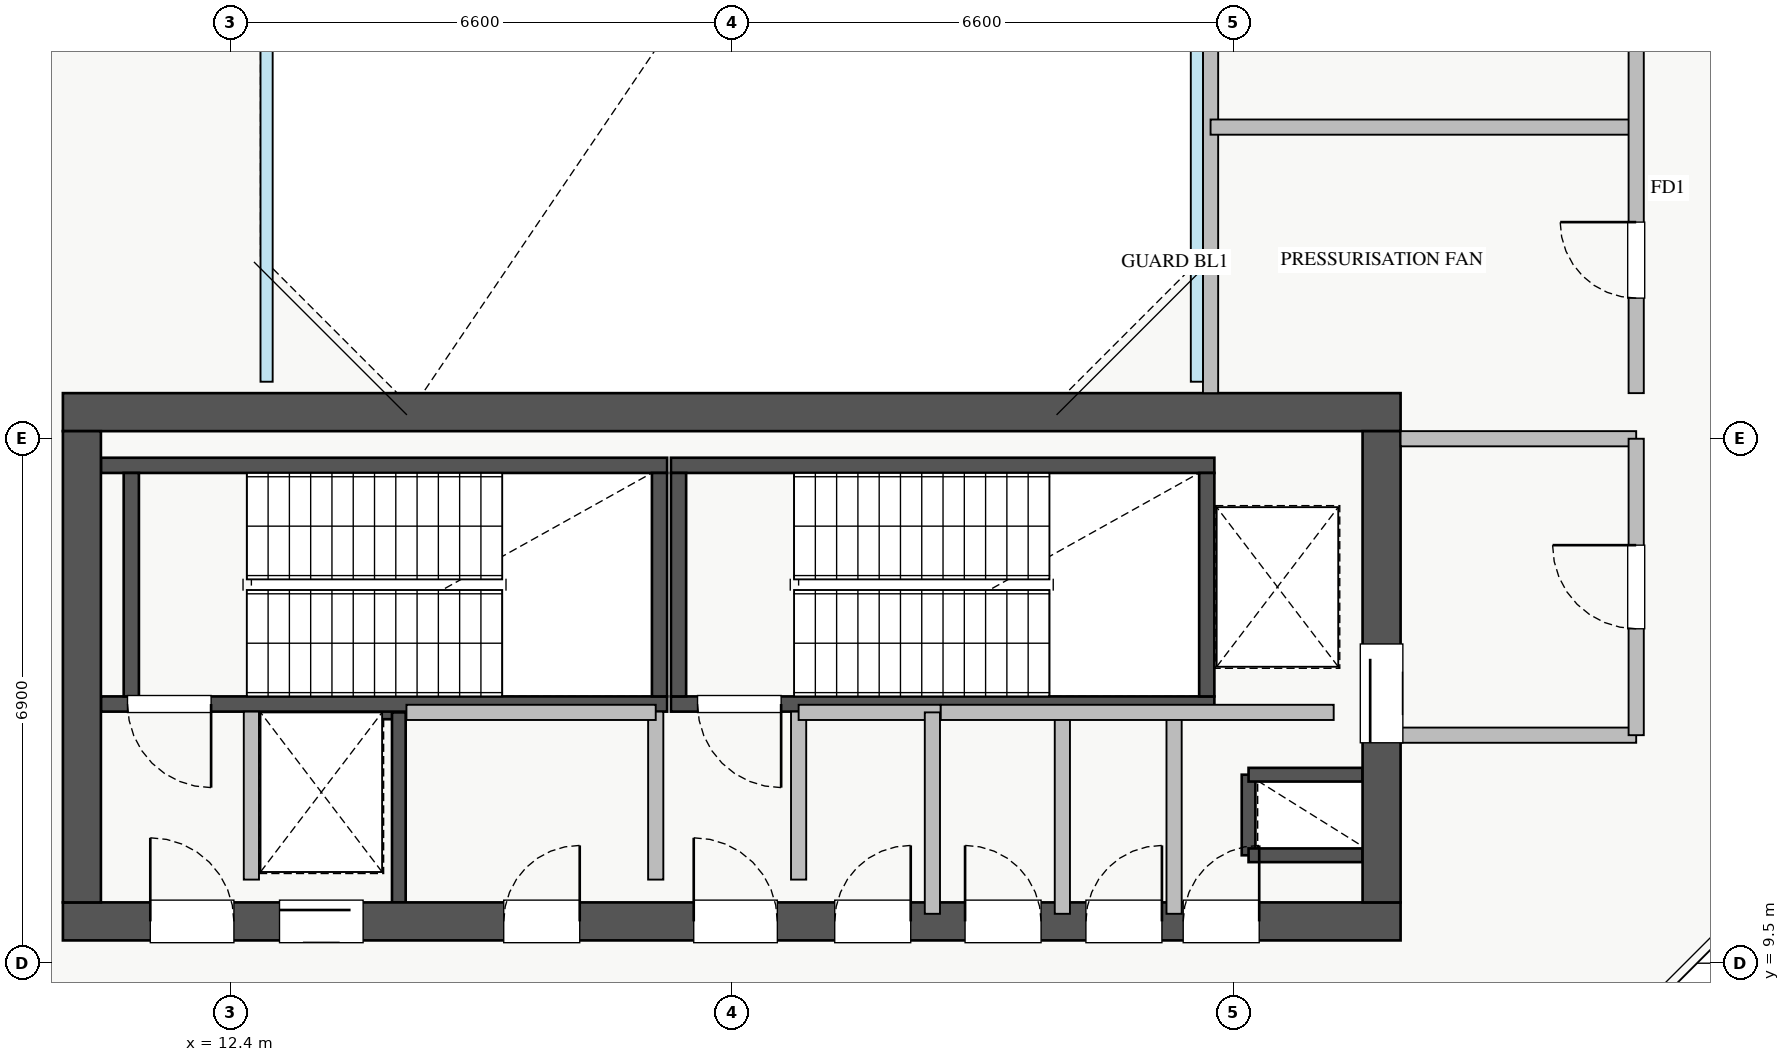
"""IFC4 building model, lengths in metres.
Left out: names, types, materials, properties, quantities, classifications, styles, units other than length and angle.
Written with IfcOpenShell. Run it as: python <this file> out.ifc"""

import sys

from ifc_helpers import new_model, si_unit, direction, frame, frame_2d, origin, place, context, subcontext, project, spatial, rectangle, extrude, source, transform, mapped, element, fill, save


model = new_model("IFC4")
c1 = context("Model", 3, precision=1e-05, world=origin(), true_north=direction((0.0, 1.0)))
c2 = subcontext(c1, "Body", "Model", "MODEL_VIEW")
j1 = project(units=[si_unit("LENGTHUNIT", "METRE"), si_unit("PLANEANGLEUNIT", "RADIAN")], contexts=[c1])
p1 = place(None, origin())
s1 = spatial("IfcSite", under=j1, at=p1, CompositionType="ELEMENT")
p2 = place(p1, origin())
s2 = spatial("IfcBuilding", under=s1, at=p2, CompositionType="ELEMENT")
p3 = place(p2, frame((0.0, 0.0, 232.75)))
s3 = spatial("IfcBuildingStorey", under=s2, at=p3, CompositionType="ELEMENT", Elevation=232.75)
p4 = place(p3, frame((12.68, 12.8, 0.0), z_axis=(0.0, 0.0, 1.0), x_axis=(1.0, 0.0, 0.0)))
e1 = element("IfcWall", 1, at=p4, inside=s3, PredefinedType="SHEAR", context=c2, shape_type="SweptSolid", body=[
    extrude(rectangle(XDim=1.94, YDim=0.18, at=frame_2d((0.97, 0.0))), origin(), (0.0, 0.0, 1.0), 4.32),
])
p5 = place(p3, frame((14.62, 10.3, 0.0), z_axis=(0.0, 0.0, 1.0), x_axis=(0.0, 1.0, 0.0)))
e2 = element("IfcWall", 2, at=p5, inside=s3, PredefinedType="SHEAR", context=c2, shape_type="SweptSolid", body=[
    extrude(rectangle(XDim=2.5, YDim=0.18, at=frame_2d((1.25, 0.0))), origin(), (0.0, 0.0, 1.0), 4.32),
])
p6 = place(p3, frame((25.8, 10.92, 0.0), z_axis=(0.0, 0.0, 1.0), x_axis=(0.0, 1.0, 0.0)))
e3 = element("IfcWall", 3, at=p6, inside=s3, PredefinedType="SHEAR", context=c2, shape_type="SweptSolid", body=[
    extrude(rectangle(XDim=1.06, YDim=0.18, at=frame_2d((0.53, 0.0))), origin(), (0.0, 0.0, 1.0), 4.32),
])
for number, where, z_axis, x_axis in (
    (4, (25.8, 11.98, 0.0), (0.0, 0.0, 1.0), (1.0, 0.0, 0.0)),
    (5, (25.8, 10.92, 0.0), (0.0, 0.0, 1.0), (1.0, 0.0, 0.0)),
):
    element("IfcWall", number, at=place(p3, frame(where, z_axis=z_axis, x_axis=x_axis)), inside=s3, PredefinedType="SHEAR", context=c2, shape_type="SweptSolid", body=[
        extrude(rectangle(XDim=1.5, YDim=0.18, at=frame_2d((0.75, 0.0))), origin(), (0.0, 0.0, 1.0), 4.32),
    ])
p7 = place(p3, frame((10.7, 12.91, 0.0), z_axis=(0.0, 0.0, 1.0), x_axis=(1.0, 0.0, 0.0)))
e6 = element("IfcWall", 6, at=p7, inside=s3, PredefinedType="SHEAR", context=c2, shape_type="SweptSolid", body=[
    extrude(rectangle(XDim=7.45, YDim=0.2, at=frame_2d((3.725, 0.0))), origin(), (0.0, 0.0, 1.0), 4.5),
])
p8 = place(p7, frame((0.35, 0.0, 0.0)))
e7 = element("IfcOpeningElement", 7, at=p8, cuts=e6, PredefinedType="OPENING", context=c2, shape_type="SweptSolid", body=[
    extrude(rectangle(XDim=1.1, YDim=2.05, at=frame_2d((0.55, 1.025))), frame((0.0, 0.11, 0.0), z_axis=(0.0, -1.0, 0.0), x_axis=(1.0, 0.0, 0.0)), (0.0, 0.0, 1.0), 0.22),
])
p9 = place(p3, frame((10.7, 16.05, 0.0), z_axis=(0.0, 0.0, 1.0), x_axis=(1.0, 0.0, 0.0)))
e8 = element("IfcWall", 8, at=p9, inside=s3, PredefinedType="SHEAR", context=c2, shape_type="SweptSolid", body=[
    extrude(rectangle(XDim=7.45, YDim=0.2, at=frame_2d((3.725, 0.0))), origin(), (0.0, 0.0, 1.0), 4.5),
])
for number, where, z_axis, x_axis in (
    (9, (11.1, 13.01, 0.0), (0.0, 0.0, 1.0), (0.0, 1.0, 0.0)),
    (10, (18.05, 13.01, 0.0), (0.0, 0.0, 1.0), (0.0, 1.0, 0.0)),
):
    element("IfcWall", number, at=place(p3, frame(where, z_axis=z_axis, x_axis=x_axis)), inside=s3, PredefinedType="SHEAR", context=c2, shape_type="SweptSolid", body=[
        extrude(rectangle(XDim=2.94, YDim=0.2, at=frame_2d((1.47, 0.0))), origin(), (0.0, 0.0, 1.0), 4.5),
    ])
p10 = place(p3, frame((18.2, 12.91, 0.0), z_axis=(0.0, 0.0, 1.0), x_axis=(1.0, 0.0, 0.0)))
e11 = element("IfcWall", 11, at=p10, inside=s3, PredefinedType="SHEAR", context=c2, shape_type="SweptSolid", body=[
    extrude(rectangle(XDim=7.15, YDim=0.2, at=frame_2d((3.575, 0.0))), origin(), (0.0, 0.0, 1.0), 4.5),
])
p11 = place(p10, frame((0.35, 0.0, 0.0)))
e12 = element("IfcOpeningElement", 12, at=p11, cuts=e11, PredefinedType="OPENING", context=c2, shape_type="SweptSolid", body=[
    extrude(rectangle(XDim=1.1, YDim=2.05, at=frame_2d((0.55, 1.025))), frame((0.0, 0.11, 0.0), z_axis=(0.0, -1.0, 0.0), x_axis=(1.0, 0.0, 0.0)), (0.0, 0.0, 1.0), 0.22),
])
p12 = place(p3, frame((18.2, 16.05, 0.0), z_axis=(0.0, 0.0, 1.0), x_axis=(1.0, 0.0, 0.0)))
e13 = element("IfcWall", 13, at=p12, inside=s3, PredefinedType="SHEAR", context=c2, shape_type="SweptSolid", body=[
    extrude(rectangle(XDim=7.15, YDim=0.2, at=frame_2d((3.575, 0.0))), origin(), (0.0, 0.0, 1.0), 4.5),
])
for number, where, z_axis, x_axis in (
    (14, (18.3, 13.01, 0.0), (0.0, 0.0, 1.0), (0.0, 1.0, 0.0)),
    (15, (25.25, 13.01, 0.0), (0.0, 0.0, 1.0), (0.0, 1.0, 0.0)),
):
    element("IfcWall", number, at=place(p3, frame(where, z_axis=z_axis, x_axis=x_axis)), inside=s3, PredefinedType="SHEAR", context=c2, shape_type="SweptSolid", body=[
        extrude(rectangle(XDim=2.94, YDim=0.2, at=frame_2d((1.47, 0.0))), origin(), (0.0, 0.0, 1.0), 4.5),
    ])
p13 = place(p3, frame((10.2, 10.05, 0.0), z_axis=(0.0, 0.0, 1.0), x_axis=(1.0, 0.0, 0.0)))
e16 = element("IfcWall", 16, at=p13, inside=s3, PredefinedType="SHEAR", context=c2, shape_type="SweptSolid", body=[
    extrude(rectangle(XDim=17.6, YDim=0.5, at=frame_2d((8.8, 0.0))), origin(), (0.0, 0.0, 1.0), 4.5),
])
p14 = place(p13, frame((1.15, 0.0, 0.0)))
e17 = element("IfcOpeningElement", 17, at=p14, cuts=e16, PredefinedType="OPENING", context=c2, shape_type="SweptSolid", body=[
    extrude(rectangle(XDim=1.1, YDim=2.05, at=frame_2d((0.55, 1.025))), frame((0.0, 0.26, 0.0), z_axis=(0.0, -1.0, 0.0), x_axis=(1.0, 0.0, 0.0)), (0.0, 0.0, 1.0), 0.52),
])
p15 = place(p13, frame((8.3, 0.0, 0.0)))
e18 = element("IfcOpeningElement", 18, at=p15, cuts=e16, PredefinedType="OPENING", context=c2, shape_type="SweptSolid", body=[
    extrude(rectangle(XDim=1.1, YDim=2.05, at=frame_2d((0.55, 1.025))), frame((0.0, 0.26, 0.0), z_axis=(0.0, -1.0, 0.0), x_axis=(1.0, 0.0, 0.0)), (0.0, 0.0, 1.0), 0.52),
])
p16 = place(p13, frame((2.85, 0.0, 0.0)))
e19 = element("IfcOpeningElement", 19, at=p16, cuts=e16, PredefinedType="OPENING", context=c2, shape_type="SweptSolid", body=[
    extrude(rectangle(XDim=1.1, YDim=2.05, at=frame_2d((0.55, 1.025))), frame((0.0, 0.26, 0.0), z_axis=(0.0, -1.0, 0.0), x_axis=(1.0, 0.0, 0.0)), (0.0, 0.0, 1.0), 0.52),
])
p17 = place(p13, frame((5.8, 0.0, 0.0)))
e20 = element("IfcOpeningElement", 20, at=p17, cuts=e16, PredefinedType="OPENING", context=c2, shape_type="SweptSolid", body=[
    extrude(rectangle(XDim=1.0, YDim=2.05, at=frame_2d((0.5, 1.025))), frame((0.0, 0.26, 0.0), z_axis=(0.0, -1.0, 0.0), x_axis=(1.0, 0.0, 0.0)), (0.0, 0.0, 1.0), 0.52),
])
p18 = place(p13, frame((14.74, 0.0, 0.0)))
e21 = element("IfcOpeningElement", 21, at=p18, cuts=e16, PredefinedType="OPENING", context=c2, shape_type="SweptSolid", body=[
    extrude(rectangle(XDim=1.0, YDim=2.05, at=frame_2d((0.5, 1.025))), frame((0.0, 0.26, 0.0), z_axis=(0.0, -1.0, 0.0), x_axis=(1.0, 0.0, 0.0)), (0.0, 0.0, 1.0), 0.52),
])
p19 = place(p13, frame((10.155, 0.0, 0.0)))
e22 = element("IfcOpeningElement", 22, at=p19, cuts=e16, PredefinedType="OPENING", context=c2, shape_type="SweptSolid", body=[
    extrude(rectangle(XDim=1.0, YDim=2.05, at=frame_2d((0.5, 1.025))), frame((0.0, 0.26, 0.0), z_axis=(0.0, -1.0, 0.0), x_axis=(1.0, 0.0, 0.0)), (0.0, 0.0, 1.0), 0.52),
])
p20 = place(p13, frame((11.87, 0.0, 0.0)))
e23 = element("IfcOpeningElement", 23, at=p20, cuts=e16, PredefinedType="OPENING", context=c2, shape_type="SweptSolid", body=[
    extrude(rectangle(XDim=1.0, YDim=2.05, at=frame_2d((0.5, 1.025))), frame((0.0, 0.26, 0.0), z_axis=(0.0, -1.0, 0.0), x_axis=(1.0, 0.0, 0.0)), (0.0, 0.0, 1.0), 0.52),
])
p21 = place(p13, frame((13.46, 0.0, 0.0)))
e24 = element("IfcOpeningElement", 24, at=p21, cuts=e16, PredefinedType="OPENING", context=c2, shape_type="SweptSolid", body=[
    extrude(rectangle(XDim=1.0, YDim=2.05, at=frame_2d((0.5, 1.025))), frame((0.0, 0.26, 0.0), z_axis=(0.0, -1.0, 0.0), x_axis=(1.0, 0.0, 0.0)), (0.0, 0.0, 1.0), 0.52),
])
p22 = place(p3, frame((10.2, 16.75, 0.0), z_axis=(0.0, 0.0, 1.0), x_axis=(1.0, 0.0, 0.0)))
e25 = element("IfcWall", 25, at=p22, inside=s3, PredefinedType="SHEAR", context=c2, shape_type="SweptSolid", body=[
    extrude(rectangle(XDim=17.6, YDim=0.5, at=frame_2d((8.8, 0.0))), origin(), (0.0, 0.0, 1.0), 4.5),
])
p23 = place(p3, frame((10.45, 10.3, 0.0), z_axis=(0.0, 0.0, 1.0), x_axis=(0.0, 1.0, 0.0)))
e26 = element("IfcWall", 26, at=p23, inside=s3, PredefinedType="SHEAR", context=c2, shape_type="SweptSolid", body=[
    extrude(rectangle(XDim=6.2, YDim=0.5, at=frame_2d((3.1, 0.0))), origin(), (0.0, 0.0, 1.0), 4.5),
])
p24 = place(p3, frame((27.55, 10.3, 0.0), z_axis=(0.0, 0.0, 1.0), x_axis=(0.0, 1.0, 0.0)))
e27 = element("IfcWall", 27, at=p24, inside=s3, PredefinedType="SHEAR", context=c2, shape_type="SweptSolid", body=[
    extrude(rectangle(XDim=6.2, YDim=0.5, at=frame_2d((3.1, 0.0))), origin(), (0.0, 0.0, 1.0), 4.5),
])
p25 = place(p24, frame((2.1, 0.0, 0.0)))
e28 = element("IfcOpeningElement", 28, at=p25, cuts=e27, PredefinedType="OPENING", context=c2, shape_type="SweptSolid", body=[
    extrude(rectangle(XDim=1.3, YDim=2.05, at=frame_2d((0.65, 1.025))), frame((0.0, 0.26, 0.0), z_axis=(0.0, -1.0, 0.0), x_axis=(1.0, 0.0, 0.0)), (0.0, 0.0, 1.0), 0.52),
])
p26 = place(p3, frame((27.8, 16.4, 0.0), z_axis=(0.0, 0.0, 1.0), x_axis=(1.0, 0.0, 0.0)))
e29 = element("IfcWall", 29, at=p26, inside=s3, PredefinedType="PARTITIONING", context=c2, shape_type="SweptSolid", body=[
    extrude(rectangle(XDim=3.1, YDim=0.2, at=frame_2d((1.55, 0.0))), origin(), (0.0, 0.0, 1.0), 4.32),
])
p27 = place(p3, frame((27.8, 12.5, 0.0), z_axis=(0.0, 0.0, 1.0), x_axis=(1.0, 0.0, 0.0)))
e30 = element("IfcWall", 30, at=p27, inside=s3, PredefinedType="PARTITIONING", context=c2, shape_type="SweptSolid", body=[
    extrude(rectangle(XDim=3.1, YDim=0.2, at=frame_2d((1.55, 0.0))), origin(), (0.0, 0.0, 1.0), 2.515),
])
p28 = place(p3, frame((30.9, 12.5, 0.0), z_axis=(0.0, 0.0, 1.0), x_axis=(0.0, 1.0, 0.0)))
e31 = element("IfcWall", 31, at=p28, inside=s3, PredefinedType="PARTITIONING", context=c2, shape_type="SweptSolid", body=[
    extrude(rectangle(XDim=3.9, YDim=0.2, at=frame_2d((1.95, 0.0))), origin(), (0.0, 0.0, 1.0), 4.32),
])
p29 = place(p28, frame((1.4, 0.0, 0.0)))
e32 = element("IfcOpeningElement", 32, at=p29, cuts=e31, PredefinedType="OPENING", context=c2, shape_type="SweptSolid", body=[
    extrude(rectangle(XDim=1.1, YDim=2.05, at=frame_2d((0.55, 1.025))), frame((0.0, 0.11, 0.0), z_axis=(0.0, -1.0, 0.0), x_axis=(1.0, 0.0, 0.0)), (0.0, 0.0, 1.0), 0.22),
])
for number, where, z_axis, x_axis in (
    (33, (12.68, 10.6, 0.0), (0.0, 0.0, 1.0), (0.0, 1.0, 0.0)),
    (34, (18.0, 10.6, 0.0), (0.0, 0.0, 1.0), (0.0, 1.0, 0.0)),
    (35, (19.88, 10.6, 0.0), (0.0, 0.0, 1.0), (0.0, 1.0, 0.0)),
):
    element("IfcWall", number, at=place(p3, frame(where, z_axis=z_axis, x_axis=x_axis)), inside=s3, PredefinedType="PARTITIONING", context=c2, shape_type="SweptSolid", body=[
        extrude(rectangle(XDim=2.21, YDim=0.2, at=frame_2d((1.105, 0.0))), origin(), (0.0, 0.0, 1.0), 4.32),
    ])
p30 = place(p3, frame((14.72, 12.8, 0.0), z_axis=(0.0, 0.0, 1.0), x_axis=(1.0, 0.0, 0.0)))
e36 = element("IfcWall", 36, at=p30, inside=s3, PredefinedType="PARTITIONING", context=c2, shape_type="SweptSolid", body=[
    extrude(rectangle(XDim=3.28, YDim=0.2, at=frame_2d((1.64, 0.0))), origin(), (0.0, 0.0, 1.0), 4.32),
])
p31 = place(p3, frame((24.82, 10.15, 0.0), z_axis=(0.0, 0.0, 1.0), x_axis=(0.0, 1.0, 0.0)))
e37 = element("IfcWall", 37, at=p31, inside=s3, PredefinedType="PARTITIONING", context=c2, shape_type="SweptSolid", body=[
    extrude(rectangle(XDim=2.65, YDim=0.2, at=frame_2d((1.325, 0.0))), origin(), (0.0, 0.0, 1.0), 4.32),
])
p32 = place(p3, frame((19.88, 12.8, 0.0), z_axis=(0.0, 0.0, 1.0), x_axis=(1.0, 0.0, 0.0)))
e38 = element("IfcWall", 38, at=p32, inside=s3, PredefinedType="PARTITIONING", context=c2, shape_type="SweptSolid", body=[
    extrude(rectangle(XDim=1.87, YDim=0.2, at=frame_2d((0.935, 0.0))), origin(), (0.0, 0.0, 1.0), 4.32),
])
for number, where, z_axis, x_axis in (
    (39, (21.64, 10.15, 0.0), (0.0, 0.0, 1.0), (0.0, 1.0, 0.0)),
    (40, (23.35, 10.15, 0.0), (0.0, 0.0, 1.0), (0.0, 1.0, 0.0)),
):
    element("IfcWall", number, at=place(p3, frame(where, z_axis=z_axis, x_axis=x_axis)), inside=s3, PredefinedType="PARTITIONING", context=c2, shape_type="SweptSolid", body=[
        extrude(rectangle(XDim=2.65, YDim=0.2, at=frame_2d((1.325, 0.0))), origin(), (0.0, 0.0, 1.0), 4.32),
    ])
p33 = place(p3, frame((21.75, 12.8, 0.0), z_axis=(0.0, 0.0, 1.0), x_axis=(1.0, 0.0, 0.0)))
e41 = element("IfcWall", 41, at=p33, inside=s3, PredefinedType="PARTITIONING", context=c2, shape_type="SweptSolid", body=[
    extrude(rectangle(XDim=5.17, YDim=0.2, at=frame_2d((2.585, 0.0))), origin(), (0.0, 0.0, 1.0), 4.32),
])
p34 = place(p3, frame((25.3, 17.0, 0.0), z_axis=(0.0, 0.0, 1.0), x_axis=(0.0, 1.0, 0.0)))
e42 = element("IfcWall", 42, at=p34, inside=s3, PredefinedType="PARTITIONING", context=c2, shape_type="SweptSolid", body=[
    extrude(rectangle(XDim=12.0, YDim=0.2, at=frame_2d((6.0, 0.0))), origin(), (0.0, 0.0, 1.0), 2.515),
])
p35 = place(p3, frame((25.3, 20.5, 0.0), z_axis=(0.0, 0.0, 1.0), x_axis=(1.0, 0.0, 0.0)))
e43 = element("IfcWall", 43, at=p35, inside=s3, PredefinedType="PARTITIONING", context=c2, shape_type="SweptSolid", body=[
    extrude(rectangle(XDim=5.6, YDim=0.2, at=frame_2d((2.8, 0.0))), origin(), (0.0, 0.0, 1.0), 4.32),
])
p36 = place(p3, frame((30.9, 17.0, 0.0), z_axis=(0.0, 0.0, 1.0), x_axis=(0.0, 1.0, 0.0)))
e44 = element("IfcWall", 44, at=p36, inside=s3, PredefinedType="PARTITIONING", context=c2, shape_type="SweptSolid", body=[
    extrude(rectangle(XDim=12.0, YDim=0.2, at=frame_2d((6.0, 0.0))), origin(), (0.0, 0.0, 1.0), 4.32),
])
p37 = place(p36, frame((1.25, 0.0, 0.0)))
e45 = element("IfcOpeningElement", 45, at=p37, cuts=e44, PredefinedType="OPENING", context=c2, shape_type="SweptSolid", body=[
    extrude(rectangle(XDim=1.0, YDim=2.05, at=frame_2d((0.5, 1.025))), frame((0.0, 0.11, 0.0), z_axis=(0.0, -1.0, 0.0), x_axis=(1.0, 0.0, 0.0)), (0.0, 0.0, 1.0), 0.22),
])
p38 = place(p36, frame((7.25, 0.0, 0.0)))
e46 = element("IfcOpeningElement", 46, at=p38, cuts=e44, PredefinedType="OPENING", context=c2, shape_type="SweptSolid", body=[
    extrude(rectangle(XDim=1.0, YDim=2.05, at=frame_2d((0.5, 1.025))), frame((0.0, 0.11, 0.0), z_axis=(0.0, -1.0, 0.0), x_axis=(1.0, 0.0, 0.0)), (0.0, 0.0, 1.0), 0.22),
])
m1 = source(origin(), c2, "Body", "SweptSolid", [
    extrude(rectangle(XDim=1.3, YDim=2.05, at=frame_2d((0.65, 1.025))), frame((0.0, 0.025, 0.0), z_axis=(0.0, -1.0, 0.0), x_axis=(1.0, 0.0, 0.0)), (0.0, 0.0, 1.0), 0.05),
])
p39 = place(p25, origin())
e47 = element("IfcDoor", 47, at=p39, inside=s3, OperationType="SLIDING_TO_RIGHT", PredefinedType="DOOR", context=c2, shape_type="MappedRepresentation", body=[
    mapped(m1, transform((0.0, 0.0, 0.0), x_axis=(1.0, 0.0, 0.0), y_axis=(0.0, 1.0, 0.0), z_axis=(0.0, 0.0, 1.0), scale=1.0)),
])
fill(e28, e47)
m2 = source(origin(), c2, "Body", "SweptSolid", [
    extrude(rectangle(XDim=1.1, YDim=2.05, at=frame_2d((0.55, 1.025))), frame((0.0, 0.025, 0.0), z_axis=(0.0, -1.0, 0.0), x_axis=(1.0, 0.0, 0.0)), (0.0, 0.0, 1.0), 0.05),
])
p40 = place(p14, origin())
e48 = element("IfcDoor", 48, at=p40, inside=s3, OperationType="SINGLE_SWING_LEFT", PredefinedType="DOOR", context=c2, shape_type="MappedRepresentation", body=[
    mapped(m2, transform((0.0, 0.0, 0.0), x_axis=(1.0, 0.0, 0.0), y_axis=(0.0, 1.0, 0.0), z_axis=(0.0, 0.0, 1.0), scale=1.0)),
])
fill(e17, e48)
p41 = place(p8, frame((1.1, 0.0, 0.0), z_axis=(0.0, 0.0, 1.0), x_axis=(-1.0, 0.0, 0.0)))
e49 = element("IfcDoor", 49, at=p41, inside=s3, OperationType="SINGLE_SWING_RIGHT", PredefinedType="DOOR", context=c2, shape_type="MappedRepresentation", body=[
    mapped(m2, transform((0.0, 0.0, 0.0), x_axis=(1.0, 0.0, 0.0), y_axis=(0.0, 1.0, 0.0), z_axis=(0.0, 0.0, 1.0), scale=1.0)),
])
fill(e7, e49)
p42 = place(p15, origin())
e50 = element("IfcDoor", 50, at=p42, inside=s3, OperationType="SINGLE_SWING_LEFT", PredefinedType="DOOR", context=c2, shape_type="MappedRepresentation", body=[
    mapped(m2, transform((0.0, 0.0, 0.0), x_axis=(1.0, 0.0, 0.0), y_axis=(0.0, 1.0, 0.0), z_axis=(0.0, 0.0, 1.0), scale=1.0)),
])
fill(e18, e50)
p43 = place(p11, frame((1.1, 0.0, 0.0), z_axis=(0.0, 0.0, 1.0), x_axis=(-1.0, 0.0, 0.0)))
e51 = element("IfcDoor", 51, at=p43, inside=s3, OperationType="SINGLE_SWING_RIGHT", PredefinedType="DOOR", context=c2, shape_type="MappedRepresentation", body=[
    mapped(m2, transform((0.0, 0.0, 0.0), x_axis=(1.0, 0.0, 0.0), y_axis=(0.0, 1.0, 0.0), z_axis=(0.0, 0.0, 1.0), scale=1.0)),
])
fill(e12, e51)
p44 = place(p16, origin())
e52 = element("IfcDoor", 52, at=p44, inside=s3, OperationType="SLIDING_TO_RIGHT", PredefinedType="DOOR", context=c2, shape_type="MappedRepresentation", body=[
    mapped(m2, transform((0.0, 0.0, 0.0), x_axis=(1.0, 0.0, 0.0), y_axis=(0.0, 1.0, 0.0), z_axis=(0.0, 0.0, 1.0), scale=1.0)),
])
fill(e19, e52)
m3 = source(origin(), c2, "Body", "SweptSolid", [
    extrude(rectangle(XDim=1.0, YDim=2.05, at=frame_2d((0.5, 1.025))), frame((0.0, 0.025, 0.0), z_axis=(0.0, -1.0, 0.0), x_axis=(1.0, 0.0, 0.0)), (0.0, 0.0, 1.0), 0.05),
])
p45 = place(p17, origin())
e53 = element("IfcDoor", 53, at=p45, inside=s3, OperationType="SINGLE_SWING_RIGHT", PredefinedType="DOOR", context=c2, shape_type="MappedRepresentation", body=[
    mapped(m3, transform((0.0, 0.0, 0.0), x_axis=(1.0, 0.0, 0.0), y_axis=(0.0, 1.0, 0.0), z_axis=(0.0, 0.0, 1.0), scale=1.0)),
])
fill(e20, e53)
p46 = place(p18, origin())
e54 = element("IfcDoor", 54, at=p46, inside=s3, OperationType="SINGLE_SWING_RIGHT", PredefinedType="DOOR", context=c2, shape_type="MappedRepresentation", body=[
    mapped(m3, transform((0.0, 0.0, 0.0), x_axis=(1.0, 0.0, 0.0), y_axis=(0.0, 1.0, 0.0), z_axis=(0.0, 0.0, 1.0), scale=1.0)),
])
fill(e21, e54)
p47 = place(p19, origin())
e55 = element("IfcDoor", 55, at=p47, inside=s3, OperationType="SINGLE_SWING_RIGHT", PredefinedType="DOOR", context=c2, shape_type="MappedRepresentation", body=[
    mapped(m3, transform((0.0, 0.0, 0.0), x_axis=(1.0, 0.0, 0.0), y_axis=(0.0, 1.0, 0.0), z_axis=(0.0, 0.0, 1.0), scale=1.0)),
])
fill(e22, e55)
p48 = place(p20, origin())
e56 = element("IfcDoor", 56, at=p48, inside=s3, OperationType="SINGLE_SWING_LEFT", PredefinedType="DOOR", context=c2, shape_type="MappedRepresentation", body=[
    mapped(m3, transform((0.0, 0.0, 0.0), x_axis=(1.0, 0.0, 0.0), y_axis=(0.0, 1.0, 0.0), z_axis=(0.0, 0.0, 1.0), scale=1.0)),
])
fill(e23, e56)
p49 = place(p21, origin())
e57 = element("IfcDoor", 57, at=p49, inside=s3, OperationType="SINGLE_SWING_RIGHT", PredefinedType="DOOR", context=c2, shape_type="MappedRepresentation", body=[
    mapped(m3, transform((0.0, 0.0, 0.0), x_axis=(1.0, 0.0, 0.0), y_axis=(0.0, 1.0, 0.0), z_axis=(0.0, 0.0, 1.0), scale=1.0)),
])
fill(e24, e57)
p50 = place(p29, origin())
e58 = element("IfcDoor", 58, at=p50, inside=s3, OperationType="SINGLE_SWING_RIGHT", PredefinedType="DOOR", context=c2, shape_type="MappedRepresentation", body=[
    mapped(m2, transform((0.0, 0.0, 0.0), x_axis=(1.0, 0.0, 0.0), y_axis=(0.0, 1.0, 0.0), z_axis=(0.0, 0.0, 1.0), scale=1.0)),
])
fill(e32, e58)
p51 = place(p37, origin())
e59 = element("IfcDoor", 59, at=p51, inside=s3, OperationType="SINGLE_SWING_RIGHT", PredefinedType="DOOR", context=c2, shape_type="MappedRepresentation", body=[
    mapped(m3, transform((0.0, 0.0, 0.0), x_axis=(1.0, 0.0, 0.0), y_axis=(0.0, 1.0, 0.0), z_axis=(0.0, 0.0, 1.0), scale=1.0)),
])
fill(e45, e59)
save(model, sys.argv[1])
